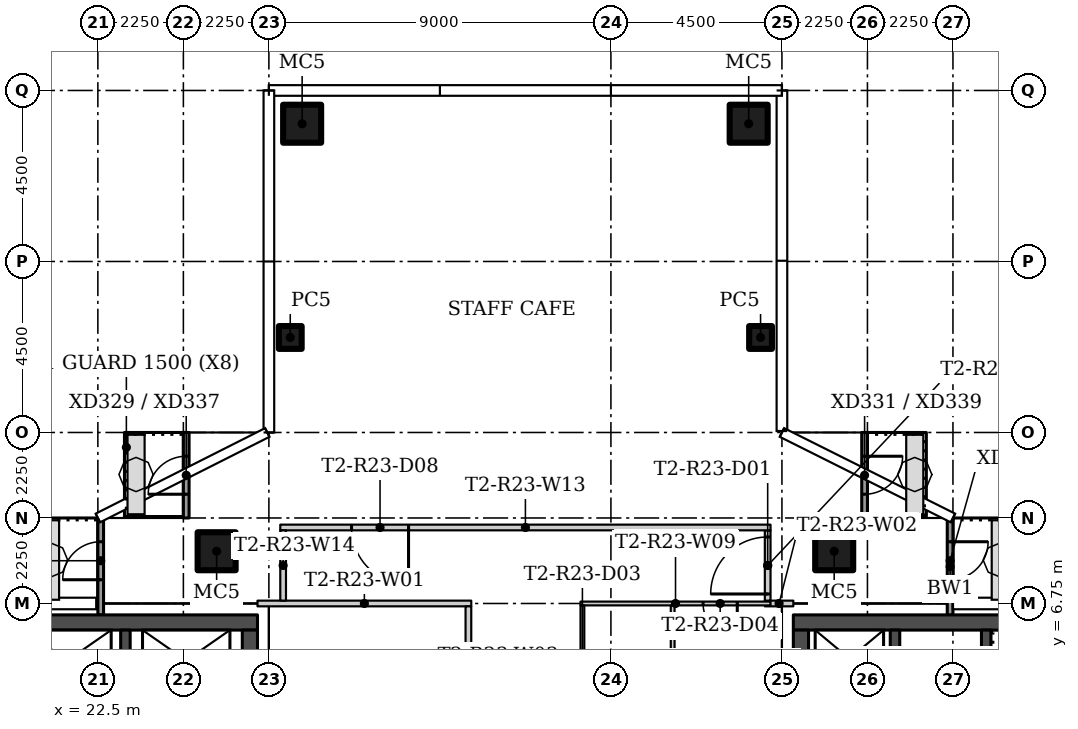
"""IFC4 building model, lengths in metres.
Left out: names, types, materials, properties, quantities, classifications, styles, units other than length and angle.
Written with IfcOpenShell. Run it as: python <this file> out.ifc"""

import sys

from ifc_helpers import new_model, si_unit, direction, frame, frame_2d, origin, origin_2d, place, context, subcontext, project, spatial, rectangle, hollow_rectangle, extrude, element, fill, save


model = new_model("IFC4")
c1 = context("Model", 3, precision=1e-05, world=origin(), true_north=direction((0.0, 1.0)))
c2 = subcontext(c1, "Body", "Model", "MODEL_VIEW")
j1 = project(units=[si_unit("LENGTHUNIT", "METRE"), si_unit("PLANEANGLEUNIT", "RADIAN")], contexts=[c1])
p1 = place(None, origin())
s1 = spatial("IfcSite", under=j1, at=p1, CompositionType="ELEMENT")
p2 = place(p1, origin())
s2 = spatial("IfcBuilding", under=s1, at=p2, CompositionType="ELEMENT")
p3 = place(p2, frame((0.0, 0.0, 210.0)))
s3 = spatial("IfcBuildingStorey", under=s2, at=p3, CompositionType="ELEMENT", Elevation=210.0)
for number, where in (
    (1, (25.625, 8.125, 0.0)),
    (2, (41.875, 8.125, 0.0)),
):
    element("IfcColumn", number, at=place(p3, frame(where)), inside=s3, PredefinedType="COLUMN", context=c2, shape_type="SweptSolid", body=[
        extrude(hollow_rectangle(XDim=1.0, YDim=1.0, WallThickness=0.04, at=origin_2d()), origin(), (0.0, 0.0, 1.0), 3.55),
    ])
p4 = place(p3, frame((39.938, 13.75, 0.0)))
e3 = element("IfcColumn", 3, at=p4, inside=s3, PredefinedType="COLUMN", context=c2, shape_type="SweptSolid", body=[
    extrude(hollow_rectangle(XDim=0.6, YDim=0.6, WallThickness=0.02, at=origin_2d()), origin(), (0.0, 0.0, 1.0), 3.55),
])
p5 = place(p3, frame((39.625, 19.375, 0.0)))
e4 = element("IfcColumn", 4, at=p5, inside=s3, PredefinedType="COLUMN", context=c2, shape_type="SweptSolid", body=[
    extrude(hollow_rectangle(XDim=1.0, YDim=1.0, WallThickness=0.04, at=origin_2d()), origin(), (0.0, 0.0, 1.0), 3.55),
])
p6 = place(p3, frame((27.562, 13.75, 0.0)))
e5 = element("IfcColumn", 5, at=p6, inside=s3, PredefinedType="COLUMN", context=c2, shape_type="SweptSolid", body=[
    extrude(hollow_rectangle(XDim=0.6, YDim=0.6, WallThickness=0.02, at=origin_2d()), origin(), (0.0, 0.0, 1.0), 3.55),
])
p7 = place(p3, frame((27.875, 19.375, 0.0)))
e6 = element("IfcColumn", 6, at=p7, inside=s3, PredefinedType="COLUMN", context=c2, shape_type="SweptSolid", body=[
    extrude(hollow_rectangle(XDim=1.0, YDim=1.0, WallThickness=0.04, at=origin_2d()), origin(), (0.0, 0.0, 1.0), 3.55),
])
p8 = place(p3, frame((32.325, 6.75, 0.0), z_axis=(0.0, 0.0, 1.0), x_axis=(-1.0, 0.0, 0.0)))
e7 = element("IfcWall", 7, at=p8, inside=s3, PredefinedType="PARTITIONING", context=c2, shape_type="SweptSolid", body=[
    extrude(rectangle(XDim=5.625, YDim=0.15, at=frame_2d((2.812, 0.0))), origin(), (0.0, 0.0, 1.0), 3.55),
])
p9 = place(p3, frame((40.8, 6.75, 0.0), z_axis=(0.0, 0.0, 1.0), x_axis=(-1.0, 0.0, 0.0)))
e8 = element("IfcWall", 8, at=p9, inside=s3, PredefinedType="PARTITIONING", context=c2, shape_type="SweptSolid", body=[
    extrude(rectangle(XDim=0.75, YDim=0.15, at=frame_2d((0.375, 0.0))), origin(), (0.0, 0.0, 1.0), 3.55),
])
p10 = place(p3, frame((32.25, 2.525, 0.0), z_axis=(0.0, 0.0, 1.0), x_axis=(0.0, 1.0, 0.0)))
e9 = element("IfcWall", 9, at=p10, inside=s3, PredefinedType="PARTITIONING", context=c2, shape_type="SweptSolid", body=[
    extrude(rectangle(XDim=4.15, YDim=0.15, at=frame_2d((2.075, 0.0))), origin(), (0.0, 0.0, 1.0), 3.55),
])
p11 = place(p10, frame((1.625, 0.0, 0.0)))
e10 = element("IfcOpeningElement", 10, at=p11, cuts=e9, PredefinedType="OPENING", context=c2, shape_type="SweptSolid", body=[
    extrude(rectangle(XDim=0.9, YDim=2.1, at=frame_2d((0.45, 1.05))), frame((0.0, 0.085, 0.0), z_axis=(0.0, -1.0, 0.0), x_axis=(1.0, 0.0, 0.0)), (0.0, 0.0, 1.0), 0.17),
])
p12 = place(p3, frame((40.2, 6.75, 0.0), z_axis=(0.0, 0.0, 1.0), x_axis=(-1.0, 0.0, 0.0)))
e11 = element("IfcWall", 11, at=p12, inside=s3, PredefinedType="PARTITIONING", context=c2, shape_type="SweptSolid", body=[
    extrude(rectangle(XDim=5.0, YDim=0.1, at=frame_2d((2.5, 0.0))), origin(), (0.0, 0.0, 1.0), 3.55),
])
p13 = place(p12, frame((0.875, 0.0, 0.0)))
e12 = element("IfcOpeningElement", 12, at=p13, cuts=e11, PredefinedType="OPENING", context=c2, shape_type="SweptSolid", body=[
    extrude(rectangle(XDim=0.9, YDim=2.1, at=frame_2d((0.45, 1.05))), frame((0.0, 0.06, 0.0), z_axis=(0.0, -1.0, 0.0), x_axis=(1.0, 0.0, 0.0)), (0.0, 0.0, 1.0), 0.12),
])
p14 = place(p3, frame((35.25, 6.7, 0.0), z_axis=(0.0, 0.0, 1.0), x_axis=(0.0, -1.0, 0.0)))
e13 = element("IfcWall", 13, at=p14, inside=s3, PredefinedType="PARTITIONING", context=c2, shape_type="SweptSolid", body=[
    extrude(rectangle(XDim=4.2, YDim=0.1, at=frame_2d((2.1, 0.0))), origin(), (0.0, 0.0, 1.0), 3.55),
])
p15 = place(p14, frame((1.65, 0.0, 0.0)))
e14 = element("IfcOpeningElement", 14, at=p15, cuts=e13, PredefinedType="OPENING", context=c2, shape_type="SweptSolid", body=[
    extrude(rectangle(XDim=0.9, YDim=2.1, at=frame_2d((0.45, 1.05))), frame((0.0, 0.06, 0.0), z_axis=(0.0, -1.0, 0.0), x_axis=(1.0, 0.0, 0.0)), (0.0, 0.0, 1.0), 0.12),
])
p16 = place(p3, frame((40.125, 6.825, 0.0), z_axis=(0.0, 0.0, 1.0), x_axis=(0.0, 1.0, 0.0)))
e15 = element("IfcWall", 15, at=p16, inside=s3, PredefinedType="PARTITIONING", context=c2, shape_type="SweptSolid", body=[
    extrude(rectangle(XDim=1.85, YDim=0.15, at=frame_2d((0.925, 0.0))), origin(), (0.0, 0.0, 1.0), 3.55),
])
p17 = place(p16, frame((0.175, 0.0, 0.0)))
e16 = element("IfcOpeningElement", 16, at=p17, cuts=e15, PredefinedType="OPENING", context=c2, shape_type="SweptSolid", body=[
    extrude(rectangle(XDim=1.5, YDim=2.1, at=frame_2d((0.75, 1.05))), frame((0.0, 0.085, 0.0), z_axis=(0.0, -1.0, 0.0), x_axis=(1.0, 0.0, 0.0)), (0.0, 0.0, 1.0), 0.17),
])
p18 = place(p3, frame((40.2, 8.75, 0.0), z_axis=(0.0, 0.0, 1.0), x_axis=(-1.0, 0.0, 0.0)))
e17 = element("IfcWall", 17, at=p18, inside=s3, PredefinedType="PARTITIONING", context=c2, shape_type="SweptSolid", body=[
    extrude(rectangle(XDim=12.9, YDim=0.15, at=frame_2d((6.45, 0.0))), origin(), (0.0, 0.0, 1.0), 3.55),
])
p19 = place(p18, frame((9.525, 0.0, 0.0)))
e18 = element("IfcOpeningElement", 18, at=p19, cuts=e17, PredefinedType="OPENING", context=c2, shape_type="SweptSolid", body=[
    extrude(rectangle(XDim=1.5, YDim=2.1, at=frame_2d((0.75, 1.05))), frame((0.0, 0.085, 0.0), z_axis=(0.0, -1.0, 0.0), x_axis=(1.0, 0.0, 0.0)), (0.0, 0.0, 1.0), 0.17),
])
p20 = place(p3, frame((27.375, 8.675, 0.0), z_axis=(0.0, 0.0, 1.0), x_axis=(0.0, -1.0, 0.0)))
e19 = element("IfcWall", 19, at=p20, inside=s3, PredefinedType="PARTITIONING", context=c2, shape_type="SweptSolid", body=[
    extrude(rectangle(XDim=1.85, YDim=0.15, at=frame_2d((0.925, 0.0))), origin(), (0.0, 0.0, 1.0), 3.55),
])
p21 = place(p3, frame((37.625, 6.7, 0.0), z_axis=(0.0, 0.0, 1.0), x_axis=(0.0, -1.0, 0.0)))
e20 = element("IfcWall", 20, at=p21, inside=s3, PredefinedType="PARTITIONING", context=c2, shape_type="SweptSolid", body=[
    extrude(rectangle(XDim=4.2, YDim=0.1, at=frame_2d((2.1, 0.0))), origin(), (0.0, 0.0, 1.0), 3.55),
])
p22 = place(p3, frame((24.825, 9.0, 0.0), z_axis=(0.0, 0.0, 1.0), x_axis=(0.0, 1.0, 0.0)))
e21 = element("IfcWall", 21, at=p22, inside=s3, PredefinedType="SOLIDWALL", context=c2, shape_type="SweptSolid", body=[
    extrude(rectangle(XDim=2.25, YDim=0.15, at=frame_2d((1.125, 0.0))), origin(), (0.0, 0.0, 1.0), 3.45),
])
p23 = place(p22, frame((0.625, 0.0, 0.0)))
e22 = element("IfcOpeningElement", 22, at=p23, cuts=e21, PredefinedType="OPENING", context=c2, shape_type="SweptSolid", body=[
    extrude(rectangle(XDim=1.0, YDim=2.4, at=frame_2d((0.5, 1.2))), frame((0.0, 0.085, 0.0), z_axis=(0.0, -1.0, 0.0), x_axis=(1.0, 0.0, 0.0)), (0.0, 0.0, 1.0), 0.17),
])
p24 = place(p3, frame((22.575, 6.448, 0.0), z_axis=(0.0, 0.0, 1.0), x_axis=(0.0, 1.0, 0.0)))
e23 = element("IfcWall", 23, at=p24, inside=s3, PredefinedType="SOLIDWALL", context=c2, shape_type="SweptSolid", body=[
    extrude(rectangle(XDim=2.552, YDim=0.15, at=frame_2d((1.276, 0.0))), origin(), (0.0, 0.0, 1.0), 3.45),
])
p25 = place(p24, frame((0.927, 0.0, 0.0)))
e24 = element("IfcOpeningElement", 24, at=p25, cuts=e23, PredefinedType="OPENING", context=c2, shape_type="SweptSolid", body=[
    extrude(rectangle(XDim=1.0, YDim=2.4, at=frame_2d((0.5, 1.2))), frame((0.0, 0.085, 0.0), z_axis=(0.0, -1.0, 0.0), x_axis=(1.0, 0.0, 0.0)), (0.0, 0.0, 1.0), 0.17),
])
p26 = place(p3, frame((42.675, 11.25, 0.0), z_axis=(0.0, 0.0, 1.0), x_axis=(0.0, -1.0, 0.0)))
e25 = element("IfcWall", 25, at=p26, inside=s3, PredefinedType="SOLIDWALL", context=c2, shape_type="SweptSolid", body=[
    extrude(rectangle(XDim=2.25, YDim=0.15, at=frame_2d((1.125, 0.0))), origin(), (0.0, 0.0, 1.0), 3.45),
])
p27 = place(p26, frame((0.625, 0.0, 0.0)))
e26 = element("IfcOpeningElement", 26, at=p27, cuts=e25, PredefinedType="OPENING", context=c2, shape_type="SweptSolid", body=[
    extrude(rectangle(XDim=1.0, YDim=2.4, at=frame_2d((0.5, 1.2))), frame((0.0, 0.085, 0.0), z_axis=(0.0, -1.0, 0.0), x_axis=(1.0, 0.0, 0.0)), (0.0, 0.0, 1.0), 0.17),
])
p28 = place(p3, frame((44.925, 9.0, 0.0), z_axis=(0.0, 0.0, 1.0), x_axis=(0.0, -1.0, 0.0)))
e27 = element("IfcWall", 27, at=p28, inside=s3, PredefinedType="SOLIDWALL", context=c2, shape_type="SweptSolid", body=[
    extrude(rectangle(XDim=2.557, YDim=0.15, at=frame_2d((1.278, 0.0))), origin(), (0.0, 0.0, 1.0), 3.45),
])
p29 = place(p28, frame((0.625, 0.0, 0.0)))
e28 = element("IfcOpeningElement", 28, at=p29, cuts=e27, PredefinedType="OPENING", context=c2, shape_type="SweptSolid", body=[
    extrude(rectangle(XDim=1.0, YDim=2.4, at=frame_2d((0.5, 1.2))), frame((0.0, 0.085, 0.0), z_axis=(0.0, -1.0, 0.0), x_axis=(1.0, 0.0, 0.0)), (0.0, 0.0, 1.0), 0.17),
])
p30 = place(p3, frame((13.8, 6.25, 0.0)))
e29 = element("IfcWall", 29, at=p30, inside=s3, PredefinedType="SHEAR", context=c2, shape_type="SweptSolid", body=[
    extrude(rectangle(XDim=12.9, YDim=0.4, at=frame_2d((6.45, 0.0))), origin(), (0.0, 0.0, 1.0), 3.55),
])
p31 = place(p3, frame((26.5, 6.05, 0.0), z_axis=(0.0, 0.0, 1.0), x_axis=(0.0, -1.0, 0.0)))
e30 = element("IfcWall", 30, at=p31, inside=s3, PredefinedType="SHEAR", context=c2, shape_type="SweptSolid", body=[
    extrude(rectangle(XDim=12.1, YDim=0.4, at=frame_2d((6.05, 0.0))), origin(), (0.0, 0.0, 1.0), 3.55),
])
p32 = place(p31, frame((10.1, 0.0, 0.0)))
e31 = element("IfcOpeningElement", 31, at=p32, cuts=e30, PredefinedType="OPENING", context=c2, shape_type="SweptSolid", body=[
    extrude(rectangle(XDim=1.2, YDim=2.1, at=frame_2d((0.6, 1.05))), frame((0.0, 0.21, 0.0), z_axis=(0.0, -1.0, 0.0), x_axis=(1.0, 0.0, 0.0)), (0.0, 0.0, 1.0), 0.42),
])
p33 = place(p31, frame((3.9, 0.0, 0.0)))
e32 = element("IfcOpeningElement", 32, at=p33, cuts=e30, PredefinedType="OPENING", context=c2, shape_type="SweptSolid", body=[
    extrude(rectangle(XDim=1.8, YDim=2.4, at=frame_2d((0.9, 1.2))), frame((0.0, 0.21, 0.0), z_axis=(0.0, -1.0, 0.0), x_axis=(1.0, 0.0, 0.0)), (0.0, 0.0, 1.0), 0.42),
])
p34 = place(p3, frame((23.225, 3.25, 0.0), z_axis=(0.0, 0.0, 1.0), x_axis=(0.0, 1.0, 0.0)))
e33 = element("IfcWall", 33, at=p34, inside=s3, PredefinedType="SHEAR", context=c2, shape_type="SweptSolid", body=[
    extrude(rectangle(XDim=2.8, YDim=0.25, at=frame_2d((1.4, 0.0))), origin(), (0.0, 0.0, 1.0), 3.55),
])
p35 = place(p3, frame((53.7, 6.25, 0.0), z_axis=(0.0, 0.0, 1.0), x_axis=(-1.0, 0.0, 0.0)))
e34 = element("IfcWall", 34, at=p35, inside=s3, PredefinedType="SHEAR", context=c2, shape_type="SweptSolid", body=[
    extrude(rectangle(XDim=12.9, YDim=0.4, at=frame_2d((6.45, 0.0))), origin(), (0.0, 0.0, 1.0), 3.55),
])
p36 = place(p3, frame((41.0, -6.05, 0.0), z_axis=(0.0, 0.0, 1.0), x_axis=(0.0, 1.0, 0.0)))
e35 = element("IfcWall", 35, at=p36, inside=s3, PredefinedType="SHEAR", context=c2, shape_type="SweptSolid", body=[
    extrude(rectangle(XDim=12.1, YDim=0.4, at=frame_2d((6.05, 0.0))), origin(), (0.0, 0.0, 1.0), 3.55),
])
p37 = place(p36, frame((0.8, 0.0, 0.0)))
e36 = element("IfcOpeningElement", 36, at=p37, cuts=e35, PredefinedType="OPENING", context=c2, shape_type="SweptSolid", body=[
    extrude(rectangle(XDim=1.2, YDim=2.1, at=frame_2d((0.6, 1.05))), frame((0.0, 0.21, 0.0), z_axis=(0.0, -1.0, 0.0), x_axis=(1.0, 0.0, 0.0)), (0.0, 0.0, 1.0), 0.42),
])
p38 = place(p36, frame((6.4, 0.0, 0.0)))
e37 = element("IfcOpeningElement", 37, at=p38, cuts=e35, PredefinedType="OPENING", context=c2, shape_type="SweptSolid", body=[
    extrude(rectangle(XDim=1.8, YDim=2.4, at=frame_2d((0.9, 1.2))), frame((0.0, 0.21, 0.0), z_axis=(0.0, -1.0, 0.0), x_axis=(1.0, 0.0, 0.0)), (0.0, 0.0, 1.0), 0.42),
])
for number, where, z_axis, x_axis in (
    (38, (45.875, 3.25, 0.0), (0.0, 0.0, 1.0), (0.0, 1.0, 0.0)),
    (39, (43.475, 3.25, 0.0), (0.0, 0.0, 1.0), (0.0, 1.0, 0.0)),
):
    element("IfcWall", number, at=place(p3, frame(where, z_axis=z_axis, x_axis=x_axis)), inside=s3, PredefinedType="SHEAR", context=c2, shape_type="SweptSolid", body=[
        extrude(rectangle(XDim=2.8, YDim=0.25, at=frame_2d((1.4, 0.0))), origin(), (0.0, 0.0, 1.0), 3.55),
    ])
p39 = place(p17, origin())
e40 = element("IfcDoor", 40, at=p39, inside=s3, OperationType="DOUBLE_DOOR_SINGLE_SWING", PredefinedType="DOOR", context=c2, shape_type="SweptSolid", body=[
    extrude(rectangle(XDim=1.5, YDim=2.1, at=frame_2d((0.75, 1.05))), frame((0.0, 0.025, 0.0), z_axis=(0.0, -1.0, 0.0), x_axis=(1.0, 0.0, 0.0)), (0.0, 0.0, 1.0), 0.05),
])
fill(e16, e40)
p40 = place(p13, origin())
e41 = element("IfcDoor", 41, at=p40, inside=s3, OperationType="SINGLE_SWING_RIGHT", PredefinedType="DOOR", context=c2, shape_type="SweptSolid", body=[
    extrude(rectangle(XDim=0.9, YDim=2.1, at=frame_2d((0.45, 1.05))), frame((0.0, 0.025, 0.0), z_axis=(0.0, -1.0, 0.0), x_axis=(1.0, 0.0, 0.0)), (0.0, 0.0, 1.0), 0.05),
])
fill(e12, e41)
p41 = place(p19, origin())
e42 = element("IfcDoor", 42, at=p41, inside=s3, OperationType="DOUBLE_DOOR_SINGLE_SWING", PredefinedType="DOOR", context=c2, shape_type="SweptSolid", body=[
    extrude(rectangle(XDim=1.5, YDim=2.1, at=frame_2d((0.75, 1.05))), frame((0.0, 0.025, 0.0), z_axis=(0.0, -1.0, 0.0), x_axis=(1.0, 0.0, 0.0)), (0.0, 0.0, 1.0), 0.05),
])
fill(e18, e42)
p42 = place(p23, origin())
e43 = element("IfcDoor", 43, at=p42, inside=s3, OperationType="SINGLE_SWING_RIGHT", PredefinedType="DOOR", context=c2, shape_type="SweptSolid", body=[
    extrude(rectangle(XDim=1.0, YDim=2.4, at=frame_2d((0.5, 1.2))), frame((0.0, 0.025, 0.0), z_axis=(0.0, -1.0, 0.0), x_axis=(1.0, 0.0, 0.0)), (0.0, 0.0, 1.0), 0.05),
])
fill(e22, e43)
p43 = place(p25, origin())
e44 = element("IfcDoor", 44, at=p43, inside=s3, OperationType="SINGLE_SWING_LEFT", PredefinedType="DOOR", context=c2, shape_type="SweptSolid", body=[
    extrude(rectangle(XDim=1.0, YDim=2.4, at=frame_2d((0.5, 1.2))), frame((0.0, 0.025, 0.0), z_axis=(0.0, -1.0, 0.0), x_axis=(1.0, 0.0, 0.0)), (0.0, 0.0, 1.0), 0.05),
])
fill(e24, e44)
p44 = place(p27, origin())
e45 = element("IfcDoor", 45, at=p44, inside=s3, OperationType="SINGLE_SWING_RIGHT", PredefinedType="DOOR", context=c2, shape_type="SweptSolid", body=[
    extrude(rectangle(XDim=1.0, YDim=2.4, at=frame_2d((0.5, 1.2))), frame((0.0, 0.025, 0.0), z_axis=(0.0, -1.0, 0.0), x_axis=(1.0, 0.0, 0.0)), (0.0, 0.0, 1.0), 0.05),
])
fill(e26, e45)
p45 = place(p29, origin())
e46 = element("IfcDoor", 46, at=p45, inside=s3, OperationType="SINGLE_SWING_LEFT", PredefinedType="DOOR", context=c2, shape_type="SweptSolid", body=[
    extrude(rectangle(XDim=1.0, YDim=2.4, at=frame_2d((0.5, 1.2))), frame((0.0, 0.025, 0.0), z_axis=(0.0, -1.0, 0.0), x_axis=(1.0, 0.0, 0.0)), (0.0, 0.0, 1.0), 0.05),
])
fill(e28, e46)
save(model, sys.argv[1])
